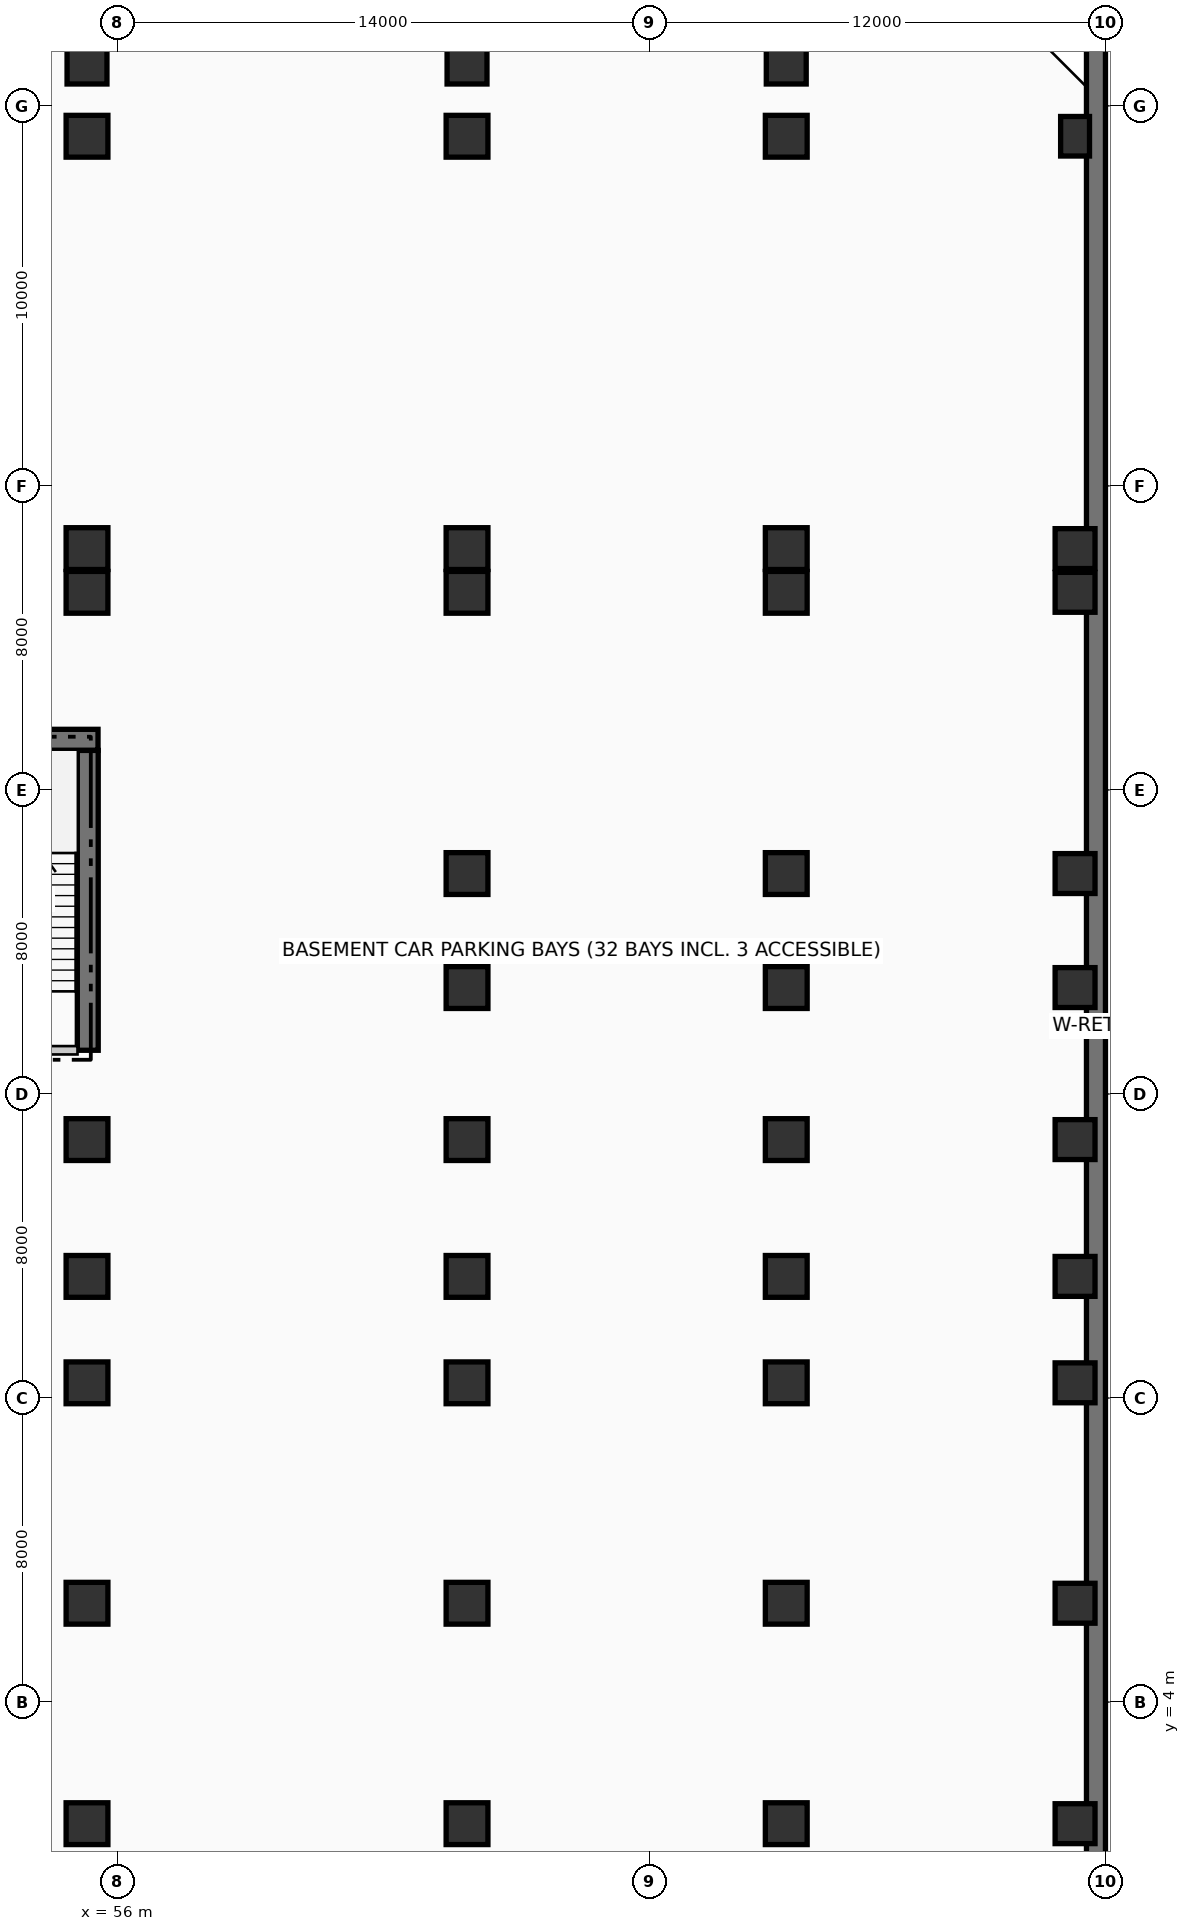
"""IFC4 building model, lengths in metres.
Left out: names, types, materials, properties, quantities, classifications, styles, units other than length and angle.
Written with IfcOpenShell. Run it as: python <this file> out.ifc"""

import sys

from ifc_helpers import new_model, si_unit, direction, frame, frame_2d, origin, origin_2d, place, context, subcontext, project, spatial, rectangle, extrude, element, save


model = new_model("IFC4")
c1 = context("Model", 3, precision=1e-05, world=origin(), true_north=direction((0.0, 1.0)))
c2 = subcontext(c1, "Body", "Model", "MODEL_VIEW")
j1 = project(units=[si_unit("LENGTHUNIT", "METRE"), si_unit("PLANEANGLEUNIT", "RADIAN")], contexts=[c1])
p1 = place(None, origin())
s1 = spatial("IfcSite", under=j1, at=p1, CompositionType="ELEMENT")
p2 = place(p1, origin())
s2 = spatial("IfcBuilding", under=s1, at=p2, CompositionType="ELEMENT")
p3 = place(p2, frame((0.0, 0.0, -9.24)))
s3 = spatial("IfcBuildingStorey", under=s2, at=p3, CompositionType="ELEMENT", Elevation=-9.24)
p4 = place(p3, frame((55.22, 21.15, 0.0), z_axis=(0.0, 0.0, 1.0), x_axis=(0.0, 1.0, 0.0)))
e1 = element("IfcWall", 1, at=p4, inside=s3, PredefinedType="SHEAR", context=c2, shape_type="SweptSolid", body=[
    extrude(rectangle(XDim=7.89, YDim=0.55, at=frame_2d((3.945, 0.0))), origin(), (0.0, 0.0, 1.0), 4.62),
])
p5 = place(p3, frame((51.25, 29.32, 0.0), z_axis=(0.0, 0.0, 1.0), x_axis=(1.0, 0.0, 0.0)))
e2 = element("IfcWall", 2, at=p5, inside=s3, PredefinedType="SHEAR", context=c2, shape_type="SweptSolid", body=[
    extrude(rectangle(XDim=4.24, YDim=0.55, at=frame_2d((2.12, 0.0))), origin(), (0.0, 0.0, 1.0), 4.62),
])
p6 = place(p3, frame((81.75, -2.0, 0.0), z_axis=(0.0, 0.0, 1.0), x_axis=(0.0, 1.0, 0.0)))
e3 = element("IfcWall", 3, at=p6, inside=s3, PredefinedType="SOLIDWALL", context=c2, shape_type="SweptSolid", body=[
    extrude(rectangle(XDim=50.0, YDim=0.5, at=frame_2d((25.0, 0.0))), origin(), (0.0, 0.0, 1.0), 4.62),
])
for number, where, z_axis, x_axis in (
    (4, (55.2, 0.8, 0.0), (0.0, 0.0, 1.0), (1.0, 0.0, 0.0)),
    (5, (55.2, 6.6, 0.0), (0.0, 0.0, 1.0), (1.0, 0.0, 0.0)),
    (6, (55.2, 12.4, 0.0), (0.0, 0.0, 1.0), (1.0, 0.0, 0.0)),
    (7, (55.2, 15.2, 0.0), (0.0, 0.0, 1.0), (1.0, 0.0, 0.0)),
    (8, (55.2, 18.8, 0.0), (0.0, 0.0, 1.0), (1.0, 0.0, 0.0)),
    (9, (55.2, 33.2, 0.0), (0.0, 0.0, 1.0), (1.0, 0.0, 0.0)),
    (10, (55.2, 34.35, 0.0), (0.0, 0.0, 1.0), (1.0, 0.0, 0.0)),
    (11, (55.2, 45.2, 0.0), (0.0, 0.0, 1.0), (1.0, 0.0, 0.0)),
):
    element("IfcColumn", number, at=place(p3, frame(where, z_axis=z_axis, x_axis=x_axis)), inside=s3, PredefinedType="COLUMN", context=c2, shape_type="SweptSolid", body=[
        extrude(rectangle(XDim=1.1, YDim=1.1, at=origin_2d()), origin(), (0.0, 0.0, 1.0), 4.62),
    ])
p7 = place(p3, frame((55.2, 47.1, 0.0), z_axis=(0.0, 0.0, 1.0), x_axis=(1.0, 0.0, 0.0)))
e12 = element("IfcColumn", 12, at=p7, inside=s3, PredefinedType="COLUMN", context=c2, shape_type="SweptSolid", body=[
    extrude(rectangle(XDim=1.05, YDim=1.05, at=origin_2d()), origin(), (0.0, 0.0, 1.0), 4.62),
])
for number, where, z_axis, x_axis in (
    (13, (65.2, 0.8, 0.0), (0.0, 0.0, 1.0), (1.0, 0.0, 0.0)),
    (14, (65.2, 6.6, 0.0), (0.0, 0.0, 1.0), (1.0, 0.0, 0.0)),
    (15, (65.2, 12.4, 0.0), (0.0, 0.0, 1.0), (1.0, 0.0, 0.0)),
    (16, (65.2, 15.2, 0.0), (0.0, 0.0, 1.0), (1.0, 0.0, 0.0)),
    (17, (65.2, 18.8, 0.0), (0.0, 0.0, 1.0), (1.0, 0.0, 0.0)),
    (18, (65.2, 22.8, 0.0), (0.0, 0.0, 1.0), (1.0, 0.0, 0.0)),
    (19, (65.2, 25.8, 0.0), (0.0, 0.0, 1.0), (1.0, 0.0, 0.0)),
    (20, (65.2, 33.2, 0.0), (0.0, 0.0, 1.0), (1.0, 0.0, 0.0)),
    (21, (65.2, 34.35, 0.0), (0.0, 0.0, 1.0), (1.0, 0.0, 0.0)),
    (22, (65.2, 45.2, 0.0), (0.0, 0.0, 1.0), (1.0, 0.0, 0.0)),
):
    element("IfcColumn", number, at=place(p3, frame(where, z_axis=z_axis, x_axis=x_axis)), inside=s3, PredefinedType="COLUMN", context=c2, shape_type="SweptSolid", body=[
        extrude(rectangle(XDim=1.1, YDim=1.1, at=origin_2d()), origin(), (0.0, 0.0, 1.0), 4.62),
    ])
p8 = place(p3, frame((65.2, 47.1, 0.0), z_axis=(0.0, 0.0, 1.0), x_axis=(1.0, 0.0, 0.0)))
e23 = element("IfcColumn", 23, at=p8, inside=s3, PredefinedType="COLUMN", context=c2, shape_type="SweptSolid", body=[
    extrude(rectangle(XDim=1.05, YDim=1.05, at=origin_2d()), origin(), (0.0, 0.0, 1.0), 4.62),
])
for number, where, z_axis, x_axis in (
    (24, (73.6, 0.8, 0.0), (0.0, 0.0, 1.0), (1.0, 0.0, 0.0)),
    (25, (73.6, 6.6, 0.0), (0.0, 0.0, 1.0), (1.0, 0.0, 0.0)),
    (26, (73.6, 12.4, 0.0), (0.0, 0.0, 1.0), (1.0, 0.0, 0.0)),
    (27, (73.6, 15.2, 0.0), (0.0, 0.0, 1.0), (1.0, 0.0, 0.0)),
    (28, (73.6, 18.8, 0.0), (0.0, 0.0, 1.0), (1.0, 0.0, 0.0)),
    (29, (73.6, 22.8, 0.0), (0.0, 0.0, 1.0), (1.0, 0.0, 0.0)),
    (30, (73.6, 25.8, 0.0), (0.0, 0.0, 1.0), (1.0, 0.0, 0.0)),
    (31, (73.6, 33.2, 0.0), (0.0, 0.0, 1.0), (1.0, 0.0, 0.0)),
    (32, (73.6, 34.35, 0.0), (0.0, 0.0, 1.0), (1.0, 0.0, 0.0)),
    (33, (73.6, 45.2, 0.0), (0.0, 0.0, 1.0), (1.0, 0.0, 0.0)),
):
    element("IfcColumn", number, at=place(p3, frame(where, z_axis=z_axis, x_axis=x_axis)), inside=s3, PredefinedType="COLUMN", context=c2, shape_type="SweptSolid", body=[
        extrude(rectangle(XDim=1.1, YDim=1.1, at=origin_2d()), origin(), (0.0, 0.0, 1.0), 4.62),
    ])
for number, where, z_axis, x_axis in (
    (34, (73.6, 47.1, 0.0), (0.0, 0.0, 1.0), (1.0, 0.0, 0.0)),
    (35, (81.2, 0.8, 0.0), (0.0, 0.0, 1.0), (1.0, 0.0, 0.0)),
    (36, (81.2, 6.6, 0.0), (0.0, 0.0, 1.0), (1.0, 0.0, 0.0)),
    (37, (81.2, 12.4, 0.0), (0.0, 0.0, 1.0), (1.0, 0.0, 0.0)),
    (38, (81.2, 15.2, 0.0), (0.0, 0.0, 1.0), (1.0, 0.0, 0.0)),
    (39, (81.2, 18.8, 0.0), (0.0, 0.0, 1.0), (1.0, 0.0, 0.0)),
    (40, (81.2, 22.8, 0.0), (0.0, 0.0, 1.0), (1.0, 0.0, 0.0)),
    (41, (81.2, 25.8, 0.0), (0.0, 0.0, 1.0), (1.0, 0.0, 0.0)),
    (42, (81.2, 33.2, 0.0), (0.0, 0.0, 1.0), (1.0, 0.0, 0.0)),
    (43, (81.2, 34.35, 0.0), (0.0, 0.0, 1.0), (1.0, 0.0, 0.0)),
):
    element("IfcColumn", number, at=place(p3, frame(where, z_axis=z_axis, x_axis=x_axis)), inside=s3, PredefinedType="COLUMN", context=c2, shape_type="SweptSolid", body=[
        extrude(rectangle(XDim=1.05, YDim=1.05, at=origin_2d()), origin(), (0.0, 0.0, 1.0), 4.62),
    ])
p9 = place(p3, frame((81.2, 45.2, 0.0), z_axis=(0.0, 0.0, 1.0), x_axis=(1.0, 0.0, 0.0)))
e44 = element("IfcColumn", 44, at=p9, inside=s3, PredefinedType="PILASTER", context=c2, shape_type="SweptSolid", body=[
    extrude(rectangle(XDim=0.76, YDim=1.04, at=origin_2d()), origin(), (0.0, 0.0, 1.0), 4.62),
])
p10 = place(p3, frame((51.8, 21.15, 0.0), z_axis=(0.0, 0.0, 1.0), x_axis=(1.0, 0.0, 0.0)))
e45 = element("IfcWall", 45, at=p10, inside=s3, PredefinedType="PARTITIONING", context=c2, shape_type="SweptSolid", body=[
    extrude(rectangle(XDim=3.15, YDim=0.22, at=frame_2d((1.575, 0.0))), origin(), (0.0, 0.0, 1.0), 4.27),
])
p11 = place(p10, frame((2.1, 0.0, 0.0), z_axis=(0.0, 0.0, 1.0), x_axis=(-1.0, 0.0, 0.0)))
e46 = element("IfcOpeningElement", 46, at=p11, cuts=e45, PredefinedType="OPENING", context=c2, shape_type="SweptSolid", body=[
    extrude(rectangle(XDim=1.05, YDim=2.15, at=frame_2d((0.525, 1.075))), frame((0.0, 0.12, 0.0), z_axis=(0.0, -1.0, 0.0), x_axis=(1.0, 0.0, 0.0)), (0.0, 0.0, 1.0), 0.24),
])
save(model, sys.argv[1])
